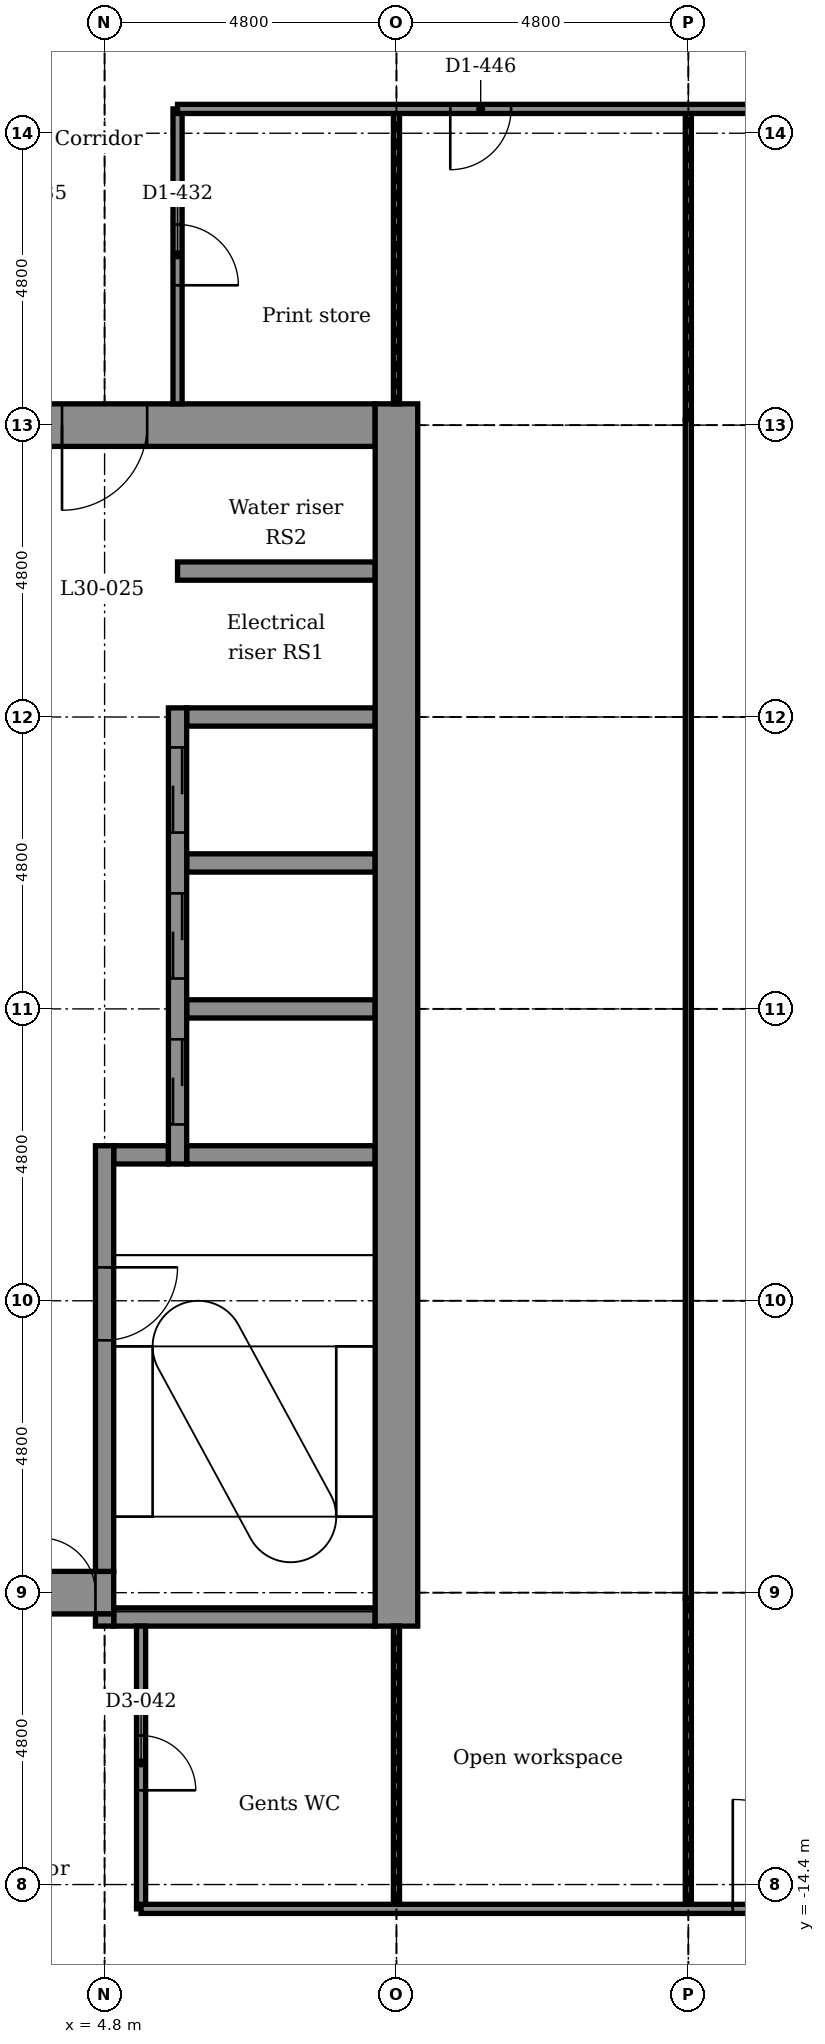
"""IFC4 building model, lengths in metres.
Left out: names, types, materials, properties, quantities, classifications, styles, units other than length and angle.
Written with IfcOpenShell. Run it as: python <this file> out.ifc"""

import sys

from ifc_helpers import new_model, si_unit, direction, frame, frame_2d, origin, place, context, subcontext, project, spatial, rectangle, extrude, element, fill, save


model = new_model("IFC4")
c1 = context("Model", 3, precision=1e-05, world=origin(), true_north=direction((0.0, 1.0)))
c2 = subcontext(c1, "Body", "Model", "MODEL_VIEW")
j1 = project(units=[si_unit("LENGTHUNIT", "METRE"), si_unit("PLANEANGLEUNIT", "RADIAN")], contexts=[c1])
p1 = place(None, origin())
s1 = spatial("IfcSite", under=j1, at=p1, CompositionType="ELEMENT")
p2 = place(p1, origin())
s2 = spatial("IfcBuilding", under=s1, at=p2, CompositionType="ELEMENT")
p3 = place(p2, frame((0.0, 0.0, 150.5)))
s3 = spatial("IfcBuildingStorey", under=s2, at=p3, CompositionType="ELEMENT", Elevation=150.5)
p4 = place(p3, frame((4.95, -10.0, -0.15), z_axis=(0.0, 0.0, 1.0), x_axis=(1.0, 0.0, 0.0)))
e1 = element("IfcWall", 1, at=p4, inside=s3, PredefinedType="STANDARD", context=c2, shape_type="SweptSolid", body=[
    extrude(rectangle(XDim=4.3, YDim=0.3, at=frame_2d((2.15, 0.0))), origin(), (0.0, 0.0, 1.0), 3.9),
])
p5 = place(p3, frame((-5.25, -9.6, -0.15), z_axis=(0.0, 0.0, 1.0), x_axis=(1.0, 0.0, 0.0)))
e2 = element("IfcWall", 2, at=p5, inside=s3, PredefinedType="SHEAR", context=c2, shape_type="SweptSolid", body=[
    extrude(rectangle(XDim=10.2, YDim=0.7, at=frame_2d((5.1, 0.0))), origin(), (0.0, 0.0, 1.0), 3.9),
])
p6 = place(p5, frame((9.0, 0.0, 0.15)))
e3 = element("IfcOpeningElement", 3, at=p6, cuts=e2, PredefinedType="OPENING", context=c2, shape_type="SweptSolid", body=[
    extrude(rectangle(XDim=0.9, YDim=2.1, at=frame_2d((0.45, 1.05))), frame((0.0, 0.36, 0.0), z_axis=(0.0, -1.0, 0.0), x_axis=(1.0, 0.0, 0.0)), (0.0, 0.0, 1.0), 0.72),
])
p7 = place(p3, frame((4.95, -2.4, -0.15), z_axis=(0.0, 0.0, 1.0), x_axis=(1.0, 0.0, 0.0)))
e4 = element("IfcWall", 4, at=p7, inside=s3, PredefinedType="STANDARD", context=c2, shape_type="SweptSolid", body=[
    extrude(rectangle(XDim=0.9, YDim=0.3, at=frame_2d((0.45, 0.0))), origin(), (0.0, 0.0, 1.0), 3.9),
])
for number, where, z_axis, x_axis in (
    (5, (6.15, -2.4, -0.15), (0.0, 0.0, 1.0), (1.0, 0.0, 0.0)),
    (6, (6.15, 0.0, -0.15), (0.0, 0.0, 1.0), (1.0, 0.0, 0.0)),
    (7, (6.15, 2.4, -0.15), (0.0, 0.0, 1.0), (1.0, 0.0, 0.0)),
    (8, (6.15, 4.8, -0.15), (0.0, 0.0, 1.0), (1.0, 0.0, 0.0)),
):
    element("IfcWall", number, at=place(p3, frame(where, z_axis=z_axis, x_axis=x_axis)), inside=s3, PredefinedType="STANDARD", context=c2, shape_type="SweptSolid", body=[
        extrude(rectangle(XDim=3.1, YDim=0.3, at=frame_2d((1.55, 0.0))), origin(), (0.0, 0.0, 1.0), 3.9),
    ])
p8 = place(p3, frame((6.0, 7.2, -0.15), z_axis=(0.0, 0.0, 1.0), x_axis=(1.0, 0.0, 0.0)))
e9 = element("IfcWall", 9, at=p8, inside=s3, PredefinedType="STANDARD", context=c2, shape_type="SweptSolid", body=[
    extrude(rectangle(XDim=3.25, YDim=0.3, at=frame_2d((1.625, 0.0))), origin(), (0.0, 0.0, 1.0), 3.9),
])
p9 = place(p3, frame((-5.25, 9.6, -0.15), z_axis=(0.0, 0.0, 1.0), x_axis=(1.0, 0.0, 0.0)))
e10 = element("IfcWall", 10, at=p9, inside=s3, PredefinedType="SHEAR", context=c2, shape_type="SweptSolid", body=[
    extrude(rectangle(XDim=14.5, YDim=0.7, at=frame_2d((7.25, 0.0))), origin(), (0.0, 0.0, 1.0), 3.9),
])
p10 = place(p9, frame((9.35, 0.0, 0.15)))
e11 = element("IfcOpeningElement", 11, at=p10, cuts=e10, PredefinedType="OPENING", context=c2, shape_type="SweptSolid", body=[
    extrude(rectangle(XDim=1.4, YDim=2.1, at=frame_2d((0.7, 1.05))), frame((0.0, 0.36, 0.0), z_axis=(0.0, -1.0, 0.0), x_axis=(1.0, 0.0, 0.0)), (0.0, 0.0, 1.0), 0.72),
])
p11 = place(p3, frame((4.8, -10.15, -0.15), z_axis=(0.0, 0.0, 1.0), x_axis=(0.0, 1.0, 0.0)))
e12 = element("IfcWall", 12, at=p11, inside=s3, PredefinedType="STANDARD", context=c2, shape_type="SweptSolid", body=[
    extrude(rectangle(XDim=0.2, YDim=0.3, at=frame_2d((0.1, 0.0))), origin(), (0.0, 0.0, 1.0), 3.9),
])
p12 = place(p3, frame((4.8, -9.25, -0.15), z_axis=(0.0, 0.0, 1.0), x_axis=(0.0, 1.0, 0.0)))
e13 = element("IfcWall", 13, at=p12, inside=s3, PredefinedType="STANDARD", context=c2, shape_type="SweptSolid", body=[
    extrude(rectangle(XDim=7.0, YDim=0.3, at=frame_2d((3.5, 0.0))), origin(), (0.0, 0.0, 1.0), 3.9),
])
p13 = place(p12, frame((3.8, 0.0, 0.15)))
e14 = element("IfcOpeningElement", 14, at=p13, cuts=e13, PredefinedType="OPENING", context=c2, shape_type="SweptSolid", body=[
    extrude(rectangle(XDim=1.2, YDim=2.1, at=frame_2d((0.6, 1.05))), frame((0.0, 0.16, 0.0), z_axis=(0.0, -1.0, 0.0), x_axis=(1.0, 0.0, 0.0)), (0.0, 0.0, 1.0), 0.32),
])
p14 = place(p3, frame((6.0, -2.55, -0.15), z_axis=(0.0, 0.0, 1.0), x_axis=(0.0, 1.0, 0.0)))
e15 = element("IfcWall", 15, at=p14, inside=s3, PredefinedType="STANDARD", context=c2, shape_type="SweptSolid", body=[
    extrude(rectangle(XDim=7.5, YDim=0.3, at=frame_2d((3.75, 0.0))), origin(), (0.0, 0.0, 1.0), 3.9),
])
p15 = place(p14, frame((0.65, 0.0, 0.15)))
e16 = element("IfcOpeningElement", 16, at=p15, cuts=e15, PredefinedType="OPENING", context=c2, shape_type="SweptSolid", body=[
    extrude(rectangle(XDim=1.4, YDim=2.1, at=frame_2d((0.7, 1.05))), frame((0.0, 0.16, 0.0), z_axis=(0.0, -1.0, 0.0), x_axis=(1.0, 0.0, 0.0)), (0.0, 0.0, 1.0), 0.32),
])
p16 = place(p14, frame((3.05, 0.0, 0.15)))
e17 = element("IfcOpeningElement", 17, at=p16, cuts=e15, PredefinedType="OPENING", context=c2, shape_type="SweptSolid", body=[
    extrude(rectangle(XDim=1.4, YDim=2.1, at=frame_2d((0.7, 1.05))), frame((0.0, 0.16, 0.0), z_axis=(0.0, -1.0, 0.0), x_axis=(1.0, 0.0, 0.0)), (0.0, 0.0, 1.0), 0.32),
])
p17 = place(p14, frame((5.45, 0.0, 0.15)))
e18 = element("IfcOpeningElement", 18, at=p17, cuts=e15, PredefinedType="OPENING", context=c2, shape_type="SweptSolid", body=[
    extrude(rectangle(XDim=1.4, YDim=2.1, at=frame_2d((0.7, 1.05))), frame((0.0, 0.16, 0.0), z_axis=(0.0, -1.0, 0.0), x_axis=(1.0, 0.0, 0.0)), (0.0, 0.0, 1.0), 0.32),
])
p18 = place(p3, frame((9.6, -10.15, -0.15), z_axis=(0.0, 0.0, 1.0), x_axis=(0.0, 1.0, 0.0)))
e19 = element("IfcWall", 19, at=p18, inside=s3, PredefinedType="SHEAR", context=c2, shape_type="SweptSolid", body=[
    extrude(rectangle(XDim=20.1, YDim=0.7, at=frame_2d((10.05, 0.0))), origin(), (0.0, 0.0, 1.0), 3.9),
])
p19 = place(p3, frame((14.4, -9.694, 0.0), z_axis=(0.0, 0.0, 1.0), x_axis=(0.0, 1.0, 0.0)))
e20 = element("IfcWall", 20, at=p19, inside=s3, PredefinedType="PARTITIONING", context=c2, shape_type="SweptSolid", body=[
    extrude(rectangle(XDim=19.387, YDim=0.1, at=frame_2d((9.694, 0.0))), origin(), (0.0, 0.0, 1.0), 3.75),
])
for number, where, z_axis, x_axis in (
    (21, (14.4, -14.8, 0.0), (0.0, 0.0, 1.0), (0.0, 1.0, 0.0)),
    (22, (14.4, 9.694, 0.0), (0.0, 0.0, 1.0), (0.0, 1.0, 0.0)),
):
    element("IfcWall", number, at=place(p3, frame(where, z_axis=z_axis, x_axis=x_axis)), inside=s3, PredefinedType="PARTITIONING", context=c2, shape_type="SweptSolid", body=[
        extrude(rectangle(XDim=5.106, YDim=0.1, at=frame_2d((2.553, 0.0))), origin(), (0.0, 0.0, 1.0), 3.066),
    ])
p20 = place(p3, frame((9.6, -14.8, 0.0), z_axis=(0.0, 0.0, 1.0), x_axis=(0.0, 1.0, 0.0)))
e23 = element("IfcWall", 23, at=p20, inside=s3, PredefinedType="PARTITIONING", context=c2, shape_type="SweptSolid", body=[
    extrude(rectangle(XDim=4.65, YDim=0.1, at=frame_2d((2.325, 0.0))), origin(), (0.0, 0.0, 1.0), 3.066),
])
p21 = place(p3, frame((9.6, 9.95, 0.0), z_axis=(0.0, 0.0, 1.0), x_axis=(0.0, 1.0, 0.0)))
e24 = element("IfcWall", 24, at=p21, inside=s3, PredefinedType="PARTITIONING", context=c2, shape_type="SweptSolid", body=[
    extrude(rectangle(XDim=4.85, YDim=0.1, at=frame_2d((2.425, 0.0))), origin(), (0.0, 0.0, 1.0), 3.066),
])
p22 = place(p3, frame((6.0, 9.95, 0.0), z_axis=(0.0, 0.0, 1.0), x_axis=(0.0, 1.0, 0.0)))
e25 = element("IfcWall", 25, at=p22, inside=s3, PredefinedType="PARTITIONING", context=c2, shape_type="SweptSolid", body=[
    extrude(rectangle(XDim=4.85, YDim=0.15, at=frame_2d((2.425, 0.0))), origin(), (0.0, 0.0, 1.0), 3.75),
])
p23 = place(p22, frame((1.95, 0.0, 0.0)))
e26 = element("IfcOpeningElement", 26, at=p23, cuts=e25, PredefinedType="OPENING", context=c2, shape_type="SweptSolid", body=[
    extrude(rectangle(XDim=1.0, YDim=2.1, at=frame_2d((0.5, 1.05))), frame((0.0, 0.085, 0.0), z_axis=(0.0, -1.0, 0.0), x_axis=(1.0, 0.0, 0.0)), (0.0, 0.0, 1.0), 0.17),
])
p24 = place(p3, frame((5.4, -14.8, 0.0), z_axis=(0.0, 0.0, 1.0), x_axis=(0.0, 1.0, 0.0)))
e27 = element("IfcWall", 27, at=p24, inside=s3, PredefinedType="PARTITIONING", context=c2, shape_type="SweptSolid", body=[
    extrude(rectangle(XDim=4.65, YDim=0.15, at=frame_2d((2.325, 0.0))), origin(), (0.0, 0.0, 1.0), 3.75),
])
p25 = place(p24, frame((1.95, 0.0, 0.0)))
e28 = element("IfcOpeningElement", 28, at=p25, cuts=e27, PredefinedType="OPENING", context=c2, shape_type="SweptSolid", body=[
    extrude(rectangle(XDim=0.9, YDim=2.1, at=frame_2d((0.45, 1.05))), frame((0.0, 0.085, 0.0), z_axis=(0.0, -1.0, 0.0), x_axis=(1.0, 0.0, 0.0)), (0.0, 0.0, 1.0), 0.17),
])
p26 = place(p3, frame((5.4, -14.8, 0.0), z_axis=(0.0, 0.0, 1.0), x_axis=(1.0, 0.0, 0.0)))
e29 = element("IfcWall", 29, at=p26, inside=s3, PredefinedType="PARTITIONING", context=c2, shape_type="SweptSolid", body=[
    extrude(rectangle(XDim=12.985, YDim=0.15, at=frame_2d((6.492, 0.0))), origin(), (0.0, 0.0, 1.0), 3.75),
])
p27 = place(p26, frame((9.731, 0.0, 0.0)))
e30 = element("IfcOpeningElement", 30, at=p27, cuts=e29, PredefinedType="OPENING", context=c2, shape_type="SweptSolid", body=[
    extrude(rectangle(XDim=1.8, YDim=2.1, at=frame_2d((0.9, 1.05))), frame((0.0, 0.085, 0.0), z_axis=(0.0, -1.0, 0.0), x_axis=(1.0, 0.0, 0.0)), (0.0, 0.0, 1.0), 0.17),
])
p28 = place(p3, frame((6.0, 14.8, 0.0), z_axis=(0.0, 0.0, 1.0), x_axis=(1.0, 0.0, 0.0)))
e31 = element("IfcWall", 31, at=p28, inside=s3, PredefinedType="PARTITIONING", context=c2, shape_type="SweptSolid", body=[
    extrude(rectangle(XDim=10.905, YDim=0.15, at=frame_2d((5.453, 0.0))), origin(), (0.0, 0.0, 1.0), 3.75),
])
p29 = place(p28, frame((4.485, 0.0, 0.0)))
e32 = element("IfcOpeningElement", 32, at=p29, cuts=e31, PredefinedType="OPENING", context=c2, shape_type="SweptSolid", body=[
    extrude(rectangle(XDim=1.0, YDim=2.1, at=frame_2d((0.5, 1.05))), frame((0.0, 0.085, 0.0), z_axis=(0.0, -1.0, 0.0), x_axis=(1.0, 0.0, 0.0)), (0.0, 0.0, 1.0), 0.17),
])
p30 = place(p23, frame((1.0, 0.0, 0.0), z_axis=(0.0, 0.0, 1.0), x_axis=(-1.0, 0.0, 0.0)))
e33 = element("IfcDoor", 33, at=p30, inside=s3, OperationType="SINGLE_SWING_LEFT", PredefinedType="DOOR", context=c2, shape_type="SweptSolid", body=[
    extrude(rectangle(XDim=1.0, YDim=2.1, at=frame_2d((0.5, 1.05))), frame((0.0, 0.025, 0.0), z_axis=(0.0, -1.0, 0.0), x_axis=(1.0, 0.0, 0.0)), (0.0, 0.0, 1.0), 0.05),
])
fill(e26, e33)
p31 = place(p25, frame((0.9, 0.0, 0.0), z_axis=(0.0, 0.0, 1.0), x_axis=(-1.0, 0.0, 0.0)))
e34 = element("IfcDoor", 34, at=p31, inside=s3, OperationType="SINGLE_SWING_LEFT", PredefinedType="DOOR", context=c2, shape_type="SweptSolid", body=[
    extrude(rectangle(XDim=0.9, YDim=2.1, at=frame_2d((0.45, 1.05))), frame((0.0, 0.025, 0.0), z_axis=(0.0, -1.0, 0.0), x_axis=(1.0, 0.0, 0.0)), (0.0, 0.0, 1.0), 0.05),
])
fill(e28, e34)
p32 = place(p29, frame((1.0, 0.0, 0.0), z_axis=(0.0, 0.0, 1.0), x_axis=(-1.0, 0.0, 0.0)))
e35 = element("IfcDoor", 35, at=p32, inside=s3, OperationType="SINGLE_SWING_LEFT", PredefinedType="DOOR", context=c2, shape_type="SweptSolid", body=[
    extrude(rectangle(XDim=1.0, YDim=2.1, at=frame_2d((0.5, 1.05))), frame((0.0, 0.025, 0.0), z_axis=(0.0, -1.0, 0.0), x_axis=(1.0, 0.0, 0.0)), (0.0, 0.0, 1.0), 0.05),
])
fill(e32, e35)
p33 = place(p27, origin())
e36 = element("IfcDoor", 36, at=p33, inside=s3, OperationType="SINGLE_SWING_LEFT", PredefinedType="DOOR", context=c2, shape_type="SweptSolid", body=[
    extrude(rectangle(XDim=1.8, YDim=2.1, at=frame_2d((0.9, 1.05))), frame((0.0, 0.025, 0.0), z_axis=(0.0, -1.0, 0.0), x_axis=(1.0, 0.0, 0.0)), (0.0, 0.0, 1.0), 0.05),
])
fill(e30, e36)
p34 = place(p15, origin())
e37 = element("IfcDoor", 37, at=p34, inside=s3, OperationType="DOUBLE_DOOR_SLIDING", PredefinedType="DOOR", context=c2, shape_type="SweptSolid", body=[
    extrude(rectangle(XDim=1.4, YDim=2.1, at=frame_2d((0.7, 1.05))), frame((0.0, 0.025, 0.0), z_axis=(0.0, -1.0, 0.0), x_axis=(1.0, 0.0, 0.0)), (0.0, 0.0, 1.0), 0.05),
])
fill(e16, e37)
p35 = place(p16, origin())
e38 = element("IfcDoor", 38, at=p35, inside=s3, OperationType="DOUBLE_DOOR_SLIDING", PredefinedType="DOOR", context=c2, shape_type="SweptSolid", body=[
    extrude(rectangle(XDim=1.4, YDim=2.1, at=frame_2d((0.7, 1.05))), frame((0.0, 0.025, 0.0), z_axis=(0.0, -1.0, 0.0), x_axis=(1.0, 0.0, 0.0)), (0.0, 0.0, 1.0), 0.05),
])
fill(e17, e38)
p36 = place(p17, origin())
e39 = element("IfcDoor", 39, at=p36, inside=s3, OperationType="DOUBLE_DOOR_SLIDING", PredefinedType="DOOR", context=c2, shape_type="SweptSolid", body=[
    extrude(rectangle(XDim=1.4, YDim=2.1, at=frame_2d((0.7, 1.05))), frame((0.0, 0.025, 0.0), z_axis=(0.0, -1.0, 0.0), x_axis=(1.0, 0.0, 0.0)), (0.0, 0.0, 1.0), 0.05),
])
fill(e18, e39)
p37 = place(p13, frame((1.2, 0.0, 0.0), z_axis=(0.0, 0.0, 1.0), x_axis=(-1.0, 0.0, 0.0)))
e40 = element("IfcDoor", 40, at=p37, inside=s3, OperationType="SINGLE_SWING_RIGHT", PredefinedType="DOOR", context=c2, shape_type="SweptSolid", body=[
    extrude(rectangle(XDim=1.2, YDim=2.1, at=frame_2d((0.6, 1.05))), frame((0.0, 0.025, 0.0), z_axis=(0.0, -1.0, 0.0), x_axis=(1.0, 0.0, 0.0)), (0.0, 0.0, 1.0), 0.05),
])
fill(e14, e40)
p38 = place(p10, frame((1.4, 0.0, 0.0), z_axis=(0.0, 0.0, 1.0), x_axis=(-1.0, 0.0, 0.0)))
e41 = element("IfcDoor", 41, at=p38, inside=s3, OperationType="SINGLE_SWING_LEFT", PredefinedType="DOOR", context=c2, shape_type="SweptSolid", body=[
    extrude(rectangle(XDim=1.4, YDim=2.1, at=frame_2d((0.7, 1.05))), frame((0.0, 0.025, 0.0), z_axis=(0.0, -1.0, 0.0), x_axis=(1.0, 0.0, 0.0)), (0.0, 0.0, 1.0), 0.05),
])
fill(e11, e41)
p39 = place(p6, origin())
e42 = element("IfcDoor", 42, at=p39, inside=s3, OperationType="SINGLE_SWING_LEFT", PredefinedType="DOOR", context=c2, shape_type="SweptSolid", body=[
    extrude(rectangle(XDim=0.9, YDim=2.1, at=frame_2d((0.45, 1.05))), frame((0.0, 0.025, 0.0), z_axis=(0.0, -1.0, 0.0), x_axis=(1.0, 0.0, 0.0)), (0.0, 0.0, 1.0), 0.05),
])
fill(e3, e42)
save(model, sys.argv[1])
